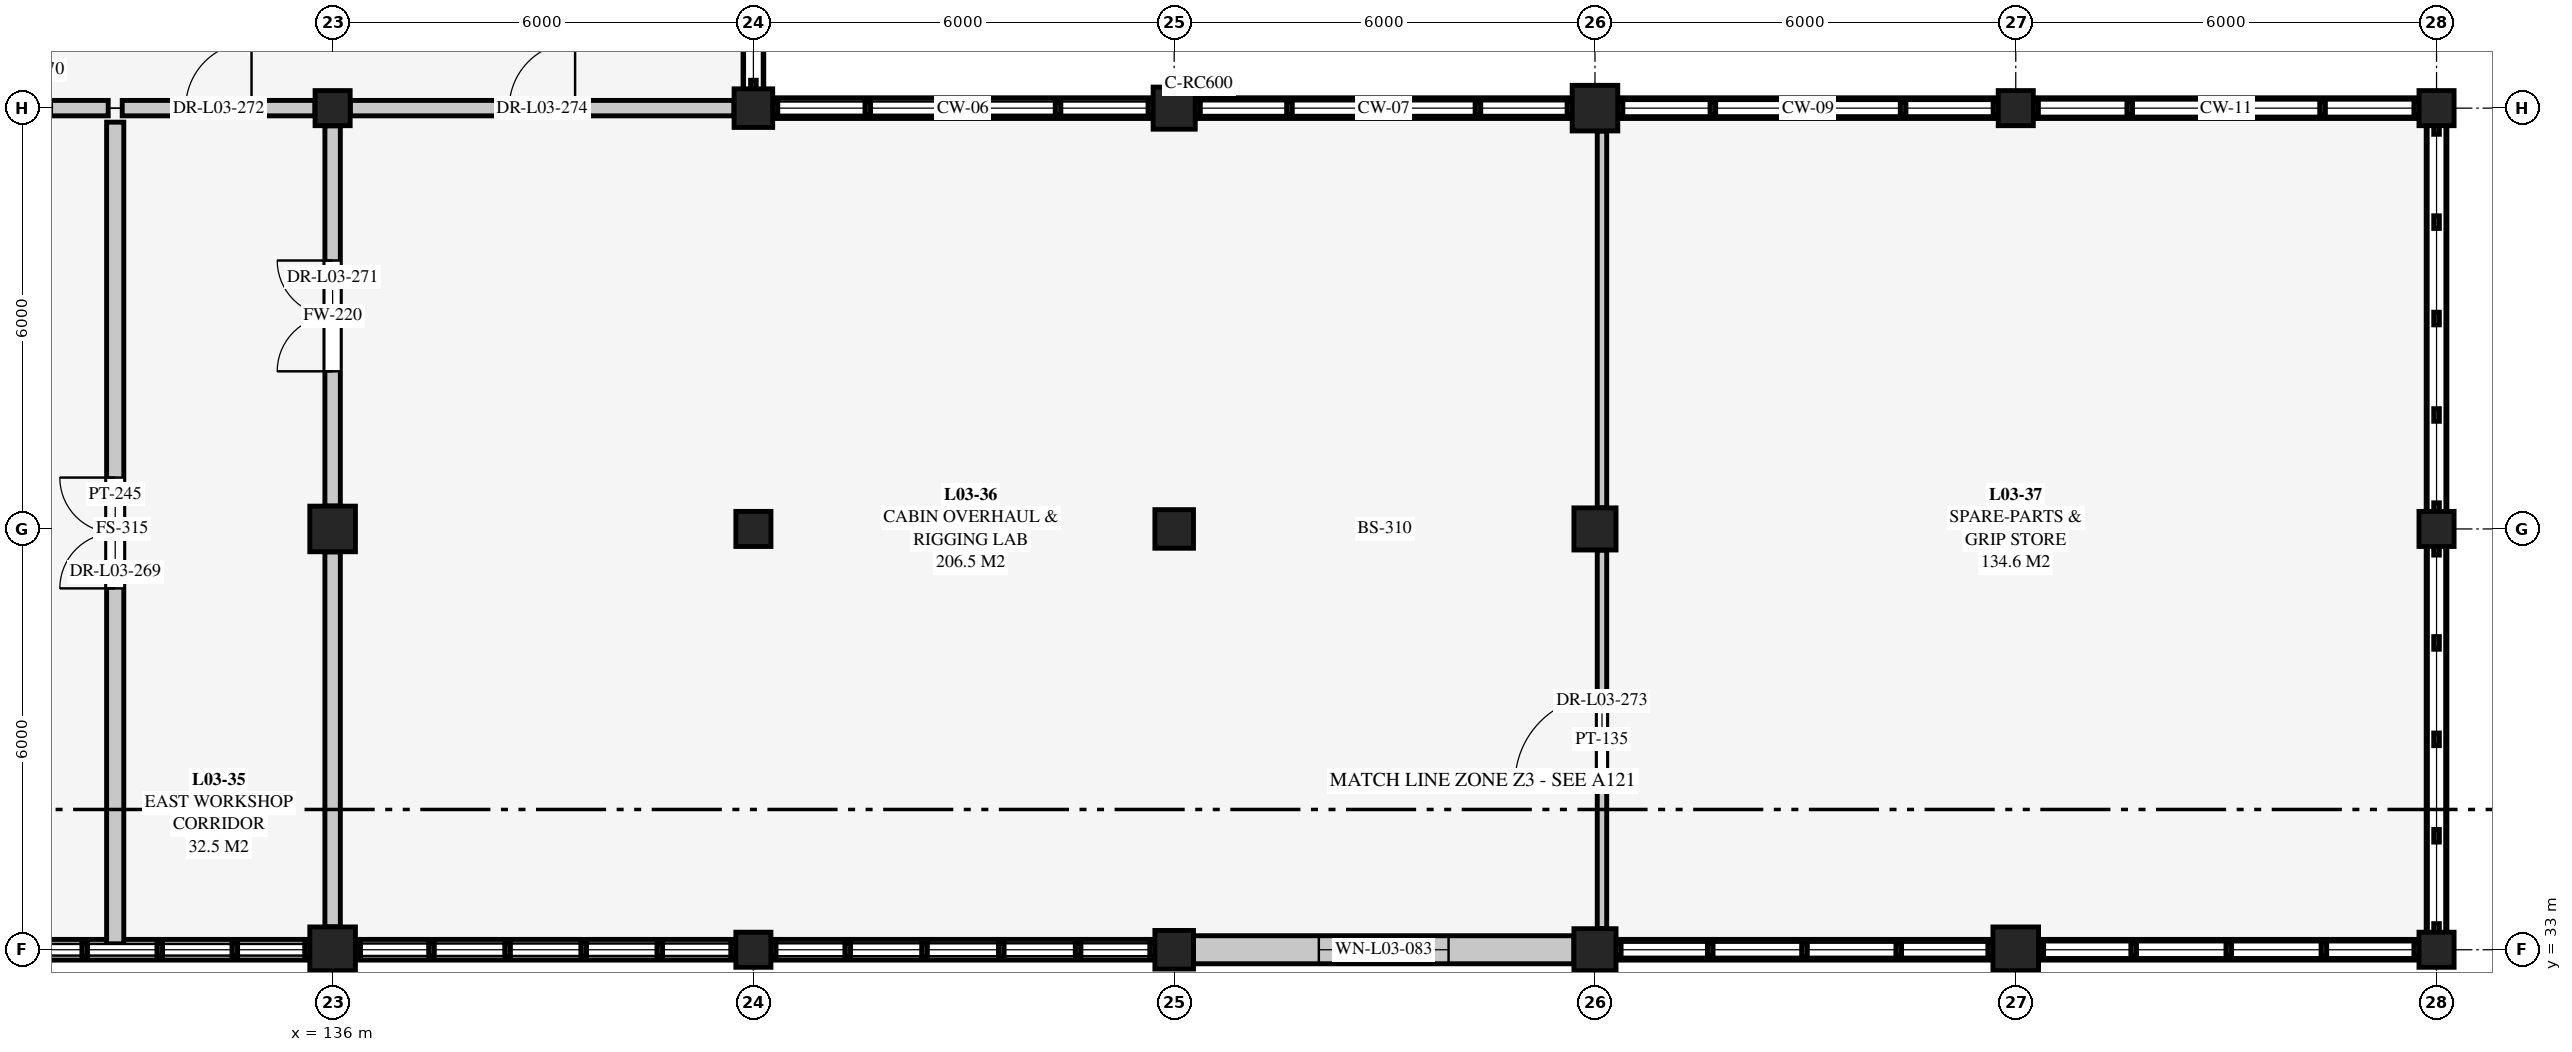
"""IFC4 building model, lengths in metres.
Left out: names, types, materials, properties, quantities, classifications, styles, units other than length and angle.
Written with IfcOpenShell. Run it as: python <this file> out.ifc"""

import sys

from ifc_helpers import new_model, si_unit, direction, frame, frame_2d, origin, origin_2d, place, context, subcontext, project, spatial, rectangle, extrude, element, fill, save


model = new_model("IFC4")
c1 = context("Model", 3, precision=1e-05, world=origin(), true_north=direction((0.0, 1.0)))
c2 = subcontext(c1, "Body", "Model", "MODEL_VIEW")
j1 = project(units=[si_unit("LENGTHUNIT", "METRE"), si_unit("PLANEANGLEUNIT", "RADIAN")], contexts=[c1])
p1 = place(None, origin())
s1 = spatial("IfcSite", under=j1, at=p1, CompositionType="ELEMENT")
p2 = place(p1, origin())
s2 = spatial("IfcBuilding", under=s1, at=p2, CompositionType="ELEMENT")
p3 = place(p2, frame((0.0, 0.0, 9.0)))
s3 = spatial("IfcBuildingStorey", under=s2, at=p3, CompositionType="ELEMENT", Elevation=9.0)
for number, where, z_axis, x_axis in (
    (1, (136.0, 33.0, 0.0), (0.0, 0.0, 1.0), (1.0, 0.0, 0.0)),
    (2, (136.0, 39.0, 0.0), (0.0, 0.0, 1.0), (1.0, 0.0, 0.0)),
):
    element("IfcColumn", number, at=place(p3, frame(where, z_axis=z_axis, x_axis=x_axis)), inside=s3, PredefinedType="COLUMN", context=c2, shape_type="SweptSolid", body=[
        extrude(rectangle(XDim=0.65, YDim=0.65, at=origin_2d()), origin(), (0.0, 0.0, 1.0), 4.5),
    ])
for number, where, z_axis, x_axis in (
    (3, (136.0, 45.0, 0.0), (0.0, 0.0, 1.0), (1.0, 0.0, 0.0)),
    (4, (142.0, 33.0, 0.0), (0.0, 0.0, 1.0), (1.0, 0.0, 0.0)),
    (5, (142.0, 39.0, 0.0), (0.0, 0.0, 1.0), (1.0, 0.0, 0.0)),
):
    element("IfcColumn", number, at=place(p3, frame(where, z_axis=z_axis, x_axis=x_axis)), inside=s3, PredefinedType="COLUMN", context=c2, shape_type="SweptSolid", body=[
        extrude(rectangle(XDim=0.5, YDim=0.5, at=origin_2d()), origin(), (0.0, 0.0, 1.0), 4.5),
    ])
for number, where, z_axis, x_axis in (
    (6, (142.0, 45.0, 0.0), (0.0, 0.0, 1.0), (1.0, 0.0, 0.0)),
    (7, (148.0, 33.0, 0.0), (0.0, 0.0, 1.0), (1.0, 0.0, 0.0)),
    (8, (148.0, 39.0, 0.0), (0.0, 0.0, 1.0), (1.0, 0.0, 0.0)),
):
    element("IfcColumn", number, at=place(p3, frame(where, z_axis=z_axis, x_axis=x_axis)), inside=s3, PredefinedType="COLUMN", context=c2, shape_type="SweptSolid", body=[
        extrude(rectangle(XDim=0.55, YDim=0.55, at=origin_2d()), origin(), (0.0, 0.0, 1.0), 4.5),
    ])
for number, where, z_axis, x_axis in (
    (9, (148.0, 45.0, 0.0), (0.0, 0.0, 1.0), (1.0, 0.0, 0.0)),
    (10, (154.0, 33.0, 0.0), (0.0, 0.0, 1.0), (1.0, 0.0, 0.0)),
    (11, (154.0, 39.0, 0.0), (0.0, 0.0, 1.0), (1.0, 0.0, 0.0)),
):
    element("IfcColumn", number, at=place(p3, frame(where, z_axis=z_axis, x_axis=x_axis)), inside=s3, PredefinedType="COLUMN", context=c2, shape_type="SweptSolid", body=[
        extrude(rectangle(XDim=0.6, YDim=0.6, at=origin_2d()), origin(), (0.0, 0.0, 1.0), 4.5),
    ])
for number, where, z_axis, x_axis in (
    (12, (154.0, 45.0, 0.0), (0.0, 0.0, 1.0), (1.0, 0.0, 0.0)),
    (13, (160.0, 33.0, 0.0), (0.0, 0.0, 1.0), (1.0, 0.0, 0.0)),
    (14, (160.0, 39.0, 0.0), (0.0, 0.0, 1.0), (1.0, 0.0, 0.0)),
):
    element("IfcColumn", number, at=place(p3, frame(where, z_axis=z_axis, x_axis=x_axis)), inside=s3, PredefinedType="COLUMN", context=c2, shape_type="SweptSolid", body=[
        extrude(rectangle(XDim=0.65, YDim=0.65, at=origin_2d()), origin(), (0.0, 0.0, 1.0), 4.5),
    ])
for number, where, z_axis, x_axis in (
    (15, (160.0, 45.0, 0.0), (0.0, 0.0, 1.0), (1.0, 0.0, 0.0)),
    (16, (166.0, 33.0, 0.0), (0.0, 0.0, 1.0), (1.0, 0.0, 0.0)),
    (17, (166.0, 39.0, 0.0), (0.0, 0.0, 1.0), (1.0, 0.0, 0.0)),
    (18, (166.0, 45.0, 0.0), (0.0, 0.0, 1.0), (1.0, 0.0, 0.0)),
):
    element("IfcColumn", number, at=place(p3, frame(where, z_axis=z_axis, x_axis=x_axis)), inside=s3, PredefinedType="COLUMN", context=c2, shape_type="SweptSolid", body=[
        extrude(rectangle(XDim=0.5, YDim=0.5, at=origin_2d()), origin(), (0.0, 0.0, 1.0), 4.5),
    ])
p4 = place(p3, frame((135.675, 33.0, 0.0), z_axis=(0.0, 0.0, 1.0), x_axis=(-1.0, 0.0, 0.0)))
e19 = element("IfcWall", 19, at=p4, inside=s3, PredefinedType="SOLIDWALL", context=c2, shape_type="SweptSolid", body=[
    extrude(rectangle(XDim=5.35, YDim=0.295, at=frame_2d((2.675, 0.0))), origin(), (0.0, 0.0, 1.0), 0.21),
])
p5 = place(p3, frame((141.75, 33.0, 0.0), z_axis=(0.0, 0.0, 1.0), x_axis=(-1.0, 0.0, 0.0)))
e20 = element("IfcWall", 20, at=p5, inside=s3, PredefinedType="SOLIDWALL", context=c2, shape_type="SweptSolid", body=[
    extrude(rectangle(XDim=5.425, YDim=0.295, at=frame_2d((2.712, 0.0))), origin(), (0.0, 0.0, 1.0), 0.31),
])
p6 = place(p3, frame((147.725, 33.0, 0.0), z_axis=(0.0, 0.0, 1.0), x_axis=(-1.0, 0.0, 0.0)))
e21 = element("IfcWall", 21, at=p6, inside=s3, PredefinedType="SOLIDWALL", context=c2, shape_type="SweptSolid", body=[
    extrude(rectangle(XDim=5.475, YDim=0.295, at=frame_2d((2.738, 0.0))), origin(), (0.0, 0.0, 1.0), 0.36),
])
p7 = place(p3, frame((142.275, 45.0, 0.0), z_axis=(0.0, 0.0, 1.0), x_axis=(1.0, 0.0, 0.0)))
e22 = element("IfcWall", 22, at=p7, inside=s3, PredefinedType="SOLIDWALL", context=c2, shape_type="SweptSolid", body=[
    extrude(rectangle(XDim=5.425, YDim=0.295, at=frame_2d((2.712, 0.0))), origin(), (0.0, 0.0, 1.0), 0.41),
])
p8 = place(p3, frame((153.7, 33.0, 0.0), z_axis=(0.0, 0.0, 1.0), x_axis=(-1.0, 0.0, 0.0)))
e23 = element("IfcWall", 23, at=p8, inside=s3, PredefinedType="SOLIDWALL", context=c2, shape_type="SweptSolid", body=[
    extrude(rectangle(XDim=5.425, YDim=0.4, at=frame_2d((2.712, 0.0))), origin(), (0.0, 0.0, 1.0), 3.893),
])
p9 = place(p8, frame((1.788, 0.0, 0.7)))
e24 = element("IfcOpeningElement", 24, at=p9, cuts=e23, PredefinedType="OPENING", context=c2, shape_type="SweptSolid", body=[
    extrude(rectangle(XDim=1.85, YDim=2.35, at=frame_2d((0.925, 1.175))), frame((0.0, 0.21, 0.0), z_axis=(0.0, -1.0, 0.0), x_axis=(1.0, 0.0, 0.0)), (0.0, 0.0, 1.0), 0.42),
])
p10 = place(p3, frame((148.3, 45.0, 0.0), z_axis=(0.0, 0.0, 1.0), x_axis=(1.0, 0.0, 0.0)))
e25 = element("IfcWall", 25, at=p10, inside=s3, PredefinedType="SOLIDWALL", context=c2, shape_type="SweptSolid", body=[
    extrude(rectangle(XDim=5.375, YDim=0.295, at=frame_2d((2.688, 0.0))), origin(), (0.0, 0.0, 1.0), 0.46),
])
p11 = place(p3, frame((159.675, 33.0, 0.0), z_axis=(0.0, 0.0, 1.0), x_axis=(-1.0, 0.0, 0.0)))
e26 = element("IfcWall", 26, at=p11, inside=s3, PredefinedType="SOLIDWALL", context=c2, shape_type="SweptSolid", body=[
    extrude(rectangle(XDim=5.375, YDim=0.295, at=frame_2d((2.688, 0.0))), origin(), (0.0, 0.0, 1.0), 0.52),
])
p12 = place(p3, frame((154.325, 45.0, 0.0), z_axis=(0.0, 0.0, 1.0), x_axis=(1.0, 0.0, 0.0)))
e27 = element("IfcWall", 27, at=p12, inside=s3, PredefinedType="SOLIDWALL", context=c2, shape_type="SweptSolid", body=[
    extrude(rectangle(XDim=5.425, YDim=0.295, at=frame_2d((2.712, 0.0))), origin(), (0.0, 0.0, 1.0), 0.16),
])
p13 = place(p3, frame((165.75, 33.0, 0.0), z_axis=(0.0, 0.0, 1.0), x_axis=(-1.0, 0.0, 0.0)))
e28 = element("IfcWall", 28, at=p13, inside=s3, PredefinedType="SOLIDWALL", context=c2, shape_type="SweptSolid", body=[
    extrude(rectangle(XDim=5.425, YDim=0.295, at=frame_2d((2.712, 0.0))), origin(), (0.0, 0.0, 1.0), 0.21),
])
p14 = place(p3, frame((160.25, 45.0, 0.0), z_axis=(0.0, 0.0, 1.0), x_axis=(1.0, 0.0, 0.0)))
e29 = element("IfcWall", 29, at=p14, inside=s3, PredefinedType="SOLIDWALL", context=c2, shape_type="SweptSolid", body=[
    extrude(rectangle(XDim=5.5, YDim=0.295, at=frame_2d((2.75, 0.0))), origin(), (0.0, 0.0, 1.0), 0.26),
])
p15 = place(p3, frame((166.0, 38.75, 0.0), z_axis=(0.0, 0.0, 1.0), x_axis=(0.0, -1.0, 0.0)))
e30 = element("IfcWall", 30, at=p15, inside=s3, PredefinedType="SOLIDWALL", context=c2, shape_type="SweptSolid", body=[
    extrude(rectangle(XDim=5.5, YDim=0.295, at=frame_2d((2.75, 0.0))), origin(), (0.0, 0.0, 1.0), 0.31),
])
p16 = place(p3, frame((166.0, 44.75, 0.0), z_axis=(0.0, 0.0, 1.0), x_axis=(0.0, -1.0, 0.0)))
e31 = element("IfcWall", 31, at=p16, inside=s3, PredefinedType="SOLIDWALL", context=c2, shape_type="SweptSolid", body=[
    extrude(rectangle(XDim=5.5, YDim=0.295, at=frame_2d((2.75, 0.0))), origin(), (0.0, 0.0, 1.0), 0.36),
])
p17 = place(p3, frame((142.0, 50.725, 0.0), z_axis=(0.0, 0.0, 1.0), x_axis=(0.0, -1.0, 0.0)))
e32 = element("IfcWall", 32, at=p17, inside=s3, PredefinedType="SOLIDWALL", context=c2, shape_type="SweptSolid", body=[
    extrude(rectangle(XDim=5.45, YDim=0.295, at=frame_2d((2.725, 0.0))), origin(), (0.0, 0.0, 1.0), 0.46),
])
p18 = place(p3, frame((132.9, 33.085, 0.0), z_axis=(0.0, 0.0, 1.0), x_axis=(0.0, 1.0, 0.0)))
e33 = element("IfcWall", 33, at=p18, inside=s3, PredefinedType="PARTITIONING", context=c2, shape_type="SweptSolid", body=[
    extrude(rectangle(XDim=11.715, YDim=0.245, at=frame_2d((5.857, 0.0))), origin(), (0.0, 0.0, 1.0), 4.3),
])
p19 = place(p18, frame((5.067, 0.0, 0.0)))
e34 = element("IfcOpeningElement", 34, at=p19, cuts=e33, PredefinedType="OPENING", context=c2, shape_type="SweptSolid", body=[
    extrude(rectangle(XDim=1.58, YDim=2.2, at=frame_2d((0.79, 1.1))), frame((0.0, 0.133, 0.0), z_axis=(0.0, -1.0, 0.0), x_axis=(1.0, 0.0, 0.0)), (0.0, 0.0, 1.0), 0.265),
])
p20 = place(p3, frame((130.252, 45.0, 0.0), z_axis=(0.0, 0.0, 1.0), x_axis=(1.0, 0.0, 0.0)))
e35 = element("IfcWall", 35, at=p20, inside=s3, PredefinedType="SOLIDWALL", context=c2, shape_type="SweptSolid", body=[
    extrude(rectangle(XDim=2.548, YDim=0.22, at=frame_2d((1.274, 0.0))), origin(), (0.0, 0.0, 1.0), 3.647),
])
p21 = place(p20, frame((0.804, 0.0, 0.0)))
e36 = element("IfcOpeningElement", 36, at=p21, cuts=e35, PredefinedType="OPENING", context=c2, shape_type="SweptSolid", body=[
    extrude(rectangle(XDim=0.94, YDim=2.1, at=frame_2d((0.47, 1.05))), frame((0.0, 0.12, 0.0), z_axis=(0.0, -1.0, 0.0), x_axis=(1.0, 0.0, 0.0)), (0.0, 0.0, 1.0), 0.24),
])
p22 = place(p3, frame((136.0, 39.327, 0.0), z_axis=(0.0, 0.0, 1.0), x_axis=(0.0, 1.0, 0.0)))
e37 = element("IfcWall", 37, at=p22, inside=s3, PredefinedType="SOLIDWALL", context=c2, shape_type="SweptSolid", body=[
    extrude(rectangle(XDim=5.421, YDim=0.22, at=frame_2d((2.71, 0.0))), origin(), (0.0, 0.0, 1.0), 3.819),
])
p23 = place(p22, frame((1.92, 0.0, 0.0)))
e38 = element("IfcOpeningElement", 38, at=p23, cuts=e37, PredefinedType="OPENING", context=c2, shape_type="SweptSolid", body=[
    extrude(rectangle(XDim=1.58, YDim=2.2, at=frame_2d((0.79, 1.1))), frame((0.0, 0.12, 0.0), z_axis=(0.0, -1.0, 0.0), x_axis=(1.0, 0.0, 0.0)), (0.0, 0.0, 1.0), 0.24),
])
p24 = place(p3, frame((136.0, 33.327, 0.0), z_axis=(0.0, 0.0, 1.0), x_axis=(0.0, 1.0, 0.0)))
e39 = element("IfcWall", 39, at=p24, inside=s3, PredefinedType="SOLIDWALL", context=c2, shape_type="SweptSolid", body=[
    extrude(rectangle(XDim=5.346, YDim=0.22, at=frame_2d((2.673, 0.0))), origin(), (0.0, 0.0, 1.0), 3.692),
])
p25 = place(p3, frame((133.0, 45.0, 0.0), z_axis=(0.0, 0.0, 1.0), x_axis=(1.0, 0.0, 0.0)))
e40 = element("IfcWall", 40, at=p25, inside=s3, PredefinedType="SOLIDWALL", context=c2, shape_type="SweptSolid", body=[
    extrude(rectangle(XDim=2.748, YDim=0.22, at=frame_2d((1.374, 0.0))), origin(), (0.0, 0.0, 1.0), 3.647),
])
p26 = place(p25, frame((0.904, 0.0, 0.0)))
e41 = element("IfcOpeningElement", 41, at=p26, cuts=e40, PredefinedType="OPENING", context=c2, shape_type="SweptSolid", body=[
    extrude(rectangle(XDim=0.94, YDim=2.1, at=frame_2d((0.47, 1.05))), frame((0.0, 0.12, 0.0), z_axis=(0.0, -1.0, 0.0), x_axis=(1.0, 0.0, 0.0)), (0.0, 0.0, 1.0), 0.24),
])
p27 = place(p3, frame((154.1, 33.302, 0.0), z_axis=(0.0, 0.0, 1.0), x_axis=(0.0, 1.0, 0.0)))
e42 = element("IfcWall", 42, at=p27, inside=s3, PredefinedType="PARTITIONING", context=c2, shape_type="SweptSolid", body=[
    extrude(rectangle(XDim=5.396, YDim=0.135, at=frame_2d((2.698, 0.0))), origin(), (0.0, 0.0, 1.0), 3.692),
])
p28 = place(p27, frame((2.078, 0.0, 0.0)))
e43 = element("IfcOpeningElement", 43, at=p28, cuts=e42, PredefinedType="OPENING", context=c2, shape_type="SweptSolid", body=[
    extrude(rectangle(XDim=1.24, YDim=2.22, at=frame_2d((0.62, 1.11))), frame((0.0, 0.077, 0.0), z_axis=(0.0, -1.0, 0.0), x_axis=(1.0, 0.0, 0.0)), (0.0, 0.0, 1.0), 0.155),
])
p29 = place(p3, frame((154.1, 39.302, 0.0), z_axis=(0.0, 0.0, 1.0), x_axis=(0.0, 1.0, 0.0)))
e44 = element("IfcWall", 44, at=p29, inside=s3, PredefinedType="PARTITIONING", context=c2, shape_type="SweptSolid", body=[
    extrude(rectangle(XDim=5.371, YDim=0.135, at=frame_2d((2.686, 0.0))), origin(), (0.0, 0.0, 1.0), 4.3),
])
p30 = place(p3, frame((136.252, 45.0, 0.0), z_axis=(0.0, 0.0, 1.0), x_axis=(1.0, 0.0, 0.0)))
e45 = element("IfcWall", 45, at=p30, inside=s3, PredefinedType="SOLIDWALL", context=c2, shape_type="SweptSolid", body=[
    extrude(rectangle(XDim=5.471, YDim=0.22, at=frame_2d((2.735, 0.0))), origin(), (0.0, 0.0, 1.0), 3.659),
])
p31 = place(p30, frame((2.265, 0.0, 0.0)))
e46 = element("IfcOpeningElement", 46, at=p31, cuts=e45, PredefinedType="OPENING", context=c2, shape_type="SweptSolid", body=[
    extrude(rectangle(XDim=0.94, YDim=2.1, at=frame_2d((0.47, 1.05))), frame((0.0, 0.12, 0.0), z_axis=(0.0, -1.0, 0.0), x_axis=(1.0, 0.0, 0.0)), (0.0, 0.0, 1.0), 0.24),
])
p32 = place(p9, origin())
e47 = element("IfcWindow", 47, at=p32, inside=s3, PartitioningType="SINGLE_PANEL", PredefinedType="WINDOW", context=c2, shape_type="SweptSolid", body=[
    extrude(rectangle(XDim=1.85, YDim=2.35, at=frame_2d((0.925, 1.175))), frame((0.0, 0.03, 0.0), z_axis=(0.0, -1.0, 0.0), x_axis=(1.0, 0.0, 0.0)), (0.0, 0.0, 1.0), 0.06),
])
fill(e24, e47)
p33 = place(p19, origin())
e48 = element("IfcDoor", 48, at=p33, inside=s3, OperationType="DOUBLE_DOOR_SINGLE_SWING", PredefinedType="DOOR", context=c2, shape_type="SweptSolid", body=[
    extrude(rectangle(XDim=1.58, YDim=2.2, at=frame_2d((0.79, 1.1))), frame((0.0, 0.025, 0.0), z_axis=(0.0, -1.0, 0.0), x_axis=(1.0, 0.0, 0.0)), (0.0, 0.0, 1.0), 0.05),
])
fill(e34, e48)
p34 = place(p23, origin())
e49 = element("IfcDoor", 49, at=p34, inside=s3, OperationType="DOUBLE_DOOR_SINGLE_SWING", PredefinedType="DOOR", context=c2, shape_type="SweptSolid", body=[
    extrude(rectangle(XDim=1.58, YDim=2.2, at=frame_2d((0.79, 1.1))), frame((0.0, 0.025, 0.0), z_axis=(0.0, -1.0, 0.0), x_axis=(1.0, 0.0, 0.0)), (0.0, 0.0, 1.0), 0.05),
])
fill(e38, e49)
p35 = place(p26, origin())
e50 = element("IfcDoor", 50, at=p35, inside=s3, OperationType="SINGLE_SWING_RIGHT", PredefinedType="DOOR", context=c2, shape_type="SweptSolid", body=[
    extrude(rectangle(XDim=0.94, YDim=2.1, at=frame_2d((0.47, 1.05))), frame((0.0, 0.025, 0.0), z_axis=(0.0, -1.0, 0.0), x_axis=(1.0, 0.0, 0.0)), (0.0, 0.0, 1.0), 0.05),
])
fill(e41, e50)
p36 = place(p28, origin())
e51 = element("IfcDoor", 51, at=p36, inside=s3, OperationType="SINGLE_SWING_LEFT", PredefinedType="DOOR", context=c2, shape_type="SweptSolid", body=[
    extrude(rectangle(XDim=1.24, YDim=2.22, at=frame_2d((0.62, 1.11))), frame((0.0, 0.025, 0.0), z_axis=(0.0, -1.0, 0.0), x_axis=(1.0, 0.0, 0.0)), (0.0, 0.0, 1.0), 0.05),
])
fill(e43, e51)
p37 = place(p31, origin())
e52 = element("IfcDoor", 52, at=p37, inside=s3, OperationType="SINGLE_SWING_RIGHT", PredefinedType="DOOR", context=c2, shape_type="SweptSolid", body=[
    extrude(rectangle(XDim=0.94, YDim=2.1, at=frame_2d((0.47, 1.05))), frame((0.0, 0.025, 0.0), z_axis=(0.0, -1.0, 0.0), x_axis=(1.0, 0.0, 0.0)), (0.0, 0.0, 1.0), 0.05),
])
fill(e46, e52)
save(model, sys.argv[1])
